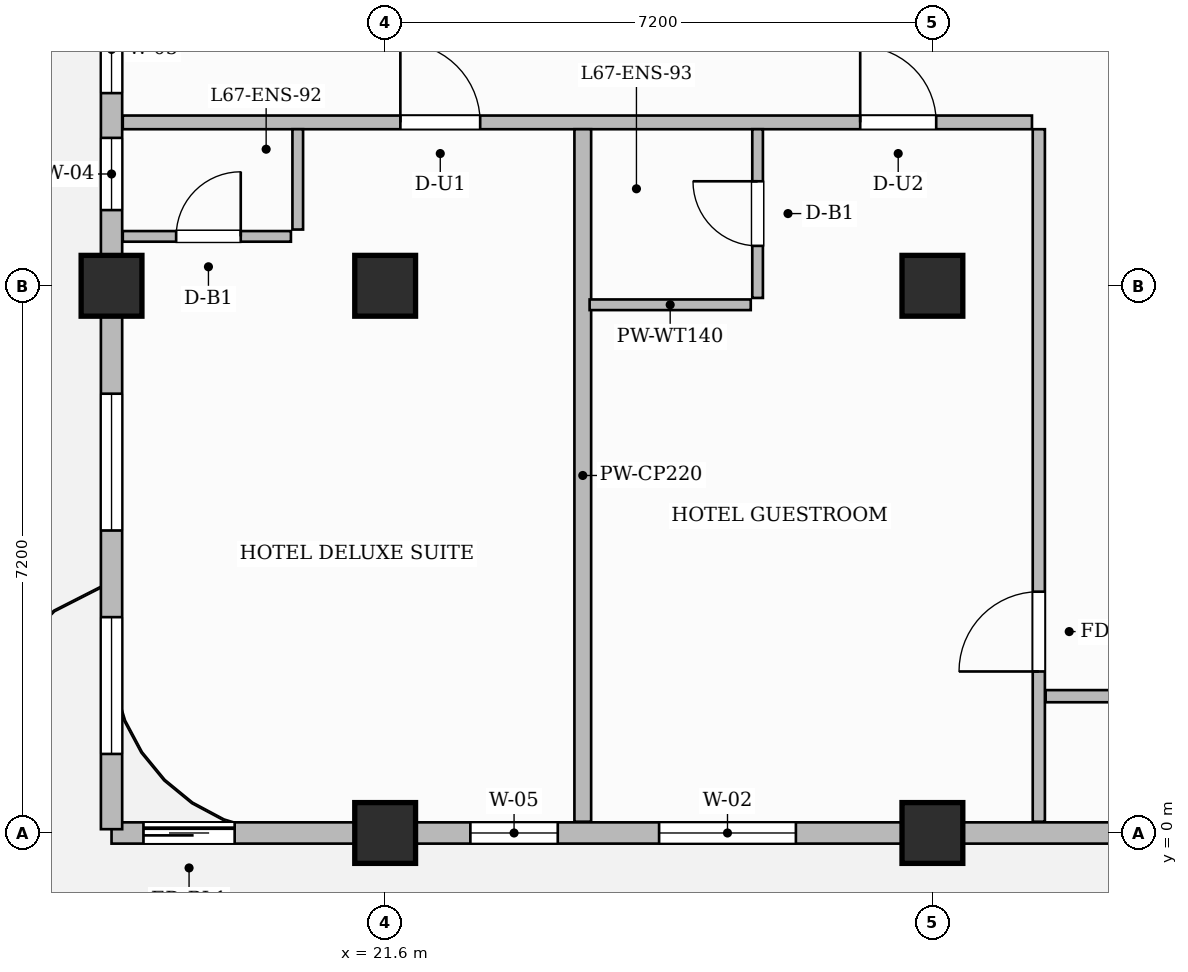
"""IFC4 building model, lengths in metres.
Left out: names, types, materials, properties, quantities, classifications, styles, units other than length and angle.
Written with IfcOpenShell. Run it as: python <this file> out.ifc"""

import sys

from ifc_helpers import new_model, si_unit, direction, frame, frame_2d, origin, origin_2d, place, context, subcontext, project, spatial, rectangle, extrude, source, transform, mapped, element, fill, save


model = new_model("IFC4")
c1 = context("Model", 3, precision=1e-05, world=origin(), true_north=direction((0.0, 1.0)))
c2 = subcontext(c1, "Body", "Model", "MODEL_VIEW")
j1 = project(units=[si_unit("LENGTHUNIT", "METRE"), si_unit("PLANEANGLEUNIT", "RADIAN")], contexts=[c1])
p1 = place(None, origin())
s1 = spatial("IfcSite", under=j1, at=p1, CompositionType="ELEMENT")
p2 = place(p1, origin())
s2 = spatial("IfcBuilding", under=s1, at=p2, CompositionType="ELEMENT")
p3 = place(p2, frame((0.0, 0.0, 267.35)))
s3 = spatial("IfcBuildingStorey", under=s2, at=p3, CompositionType="ELEMENT", Elevation=267.35)
m1 = source(origin(), c2, "Body", "SweptSolid", [
    extrude(rectangle(XDim=0.8, YDim=0.8, at=origin_2d()), origin(), (0.0, 0.0, 1.0), 3.85),
])
for number, where, z_axis, x_axis in (
    (1, (21.6, 0.0, 0.0), (0.0, 0.0, 1.0), (1.0, 0.0, 0.0)),
    (2, (21.6, 7.2, 0.0), (0.0, 0.0, 1.0), (1.0, 0.0, 0.0)),
    (3, (28.8, 0.0, 0.0), (0.0, 0.0, 1.0), (1.0, 0.0, 0.0)),
    (4, (28.8, 7.2, 0.0), (0.0, 0.0, 1.0), (1.0, 0.0, 0.0)),
    (5, (18.0, 7.2, 0.0), (0.0, 0.0, 1.0), (1.0, 0.0, 0.0)),
):
    element("IfcColumn", number, at=place(p3, frame(where, z_axis=z_axis, x_axis=x_axis)), inside=s3, PredefinedType="COLUMN", context=c2, shape_type="MappedRepresentation", body=[
        mapped(m1, transform((0.0, 0.0, 0.0), scale=1.0)),
    ])
p4 = place(p3, frame((18.148, 9.35, 0.0), z_axis=(0.0, 0.0, 1.0), x_axis=(1.0, 0.0, 0.0)))
e6 = element("IfcWall", 6, at=p4, inside=s3, PredefinedType="PARTITIONING", context=c2, shape_type="SweptSolid", body=[
    extrude(rectangle(XDim=11.962, YDim=0.18, at=frame_2d((5.981, 0.0))), origin(), (0.0, 0.0, 1.0), 3.6),
])
p5 = place(p4, frame((3.652, 0.0, 0.0)))
e7 = element("IfcOpeningElement", 7, at=p5, cuts=e6, PredefinedType="OPENING", context=c2, shape_type="SweptSolid", body=[
    extrude(rectangle(XDim=1.05, YDim=2.25, at=frame_2d((0.525, 1.125))), frame((0.0, 0.1, 0.0), z_axis=(0.0, -1.0, 0.0), x_axis=(1.0, 0.0, 0.0)), (0.0, 0.0, 1.0), 0.2),
])
p6 = place(p4, frame((9.702, 0.0, 0.0)))
e8 = element("IfcOpeningElement", 8, at=p6, cuts=e6, PredefinedType="OPENING", context=c2, shape_type="SweptSolid", body=[
    extrude(rectangle(XDim=1.0, YDim=2.2, at=frame_2d((0.5, 1.1))), frame((0.0, 0.1, 0.0), z_axis=(0.0, -1.0, 0.0), x_axis=(1.0, 0.0, 0.0)), (0.0, 0.0, 1.0), 0.2),
])
p7 = place(p3, frame((30.2, 0.148, 0.0), z_axis=(0.0, 0.0, 1.0), x_axis=(0.0, 1.0, 0.0)))
e9 = element("IfcWall", 9, at=p7, inside=s3, PredefinedType="PARTITIONING", context=c2, shape_type="SweptSolid", body=[
    extrude(rectangle(XDim=9.112, YDim=0.16, at=frame_2d((4.556, 0.0))), origin(), (0.0, 0.0, 1.0), 3.6),
])
p8 = place(p7, frame((1.977, 0.0, 0.0)))
e10 = element("IfcOpeningElement", 10, at=p8, cuts=e9, PredefinedType="OPENING", context=c2, shape_type="SweptSolid", body=[
    extrude(rectangle(XDim=1.05, YDim=2.15, at=frame_2d((0.525, 1.075))), frame((0.0, 0.09, 0.0), z_axis=(0.0, -1.0, 0.0), x_axis=(1.0, 0.0, 0.0)), (0.0, 0.0, 1.0), 0.18),
])
p9 = place(p3, frame((30.29, 1.8, 0.0), z_axis=(0.0, 0.0, 1.0), x_axis=(1.0, 0.0, 0.0)))
e11 = element("IfcWall", 11, at=p9, inside=s3, PredefinedType="PARTITIONING", context=c2, shape_type="SweptSolid", body=[
    extrude(rectangle(XDim=19.37, YDim=0.16, at=frame_2d((9.685, 0.0))), origin(), (0.0, 0.0, 1.0), 3.6),
])
p10 = place(p9, frame((3.054, 0.0, 0.0)))
e12 = element("IfcOpeningElement", 12, at=p10, cuts=e11, PredefinedType="OPENING", context=c2, shape_type="SweptSolid", body=[
    extrude(rectangle(XDim=0.9, YDim=2.15, at=frame_2d((0.45, 1.075))), frame((0.0, 0.09, 0.0), z_axis=(0.0, -1.0, 0.0), x_axis=(1.0, 0.0, 0.0)), (0.0, 0.0, 1.0), 0.18),
])
p11 = place(p9, frame((9.66, 0.0, 0.0)))
e13 = element("IfcOpeningElement", 13, at=p11, cuts=e11, PredefinedType="OPENING", context=c2, shape_type="SweptSolid", body=[
    extrude(rectangle(XDim=0.9, YDim=2.15, at=frame_2d((0.45, 1.075))), frame((0.0, 0.09, 0.0), z_axis=(0.0, -1.0, 0.0), x_axis=(1.0, 0.0, 0.0)), (0.0, 0.0, 1.0), 0.18),
])
p12 = place(p9, frame((15.86, 0.0, 0.0)))
e14 = element("IfcOpeningElement", 14, at=p12, cuts=e11, PredefinedType="OPENING", context=c2, shape_type="SweptSolid", body=[
    extrude(rectangle(XDim=0.9, YDim=2.15, at=frame_2d((0.45, 1.075))), frame((0.0, 0.09, 0.0), z_axis=(0.0, -1.0, 0.0), x_axis=(1.0, 0.0, 0.0)), (0.0, 0.0, 1.0), 0.18),
])
p13 = place(p3, frame((24.2, 0.148, 0.0), z_axis=(0.0, 0.0, 1.0), x_axis=(0.0, 1.0, 0.0)))
e15 = element("IfcWall", 15, at=p13, inside=s3, PredefinedType="PARTITIONING", context=c2, shape_type="SweptSolid", body=[
    extrude(rectangle(XDim=9.112, YDim=0.22, at=frame_2d((4.556, 0.0))), origin(), (0.0, 0.0, 1.0), 3.6),
])
p14 = place(p3, frame((20.45, 7.94, 0.0), z_axis=(0.0, 0.0, 1.0), x_axis=(0.0, 1.0, 0.0)))
e16 = element("IfcWall", 16, at=p14, inside=s3, PredefinedType="PARTITIONING", context=c2, shape_type="SweptSolid", body=[
    extrude(rectangle(XDim=1.32, YDim=0.14, at=frame_2d((0.66, 0.0))), origin(), (0.0, 0.0, 1.0), 3.6),
])
p15 = place(p3, frame((18.148, 7.85, 0.0), z_axis=(0.0, 0.0, 1.0), x_axis=(1.0, 0.0, 0.0)))
e17 = element("IfcWall", 17, at=p15, inside=s3, PredefinedType="PARTITIONING", context=c2, shape_type="SweptSolid", body=[
    extrude(rectangle(XDim=2.212, YDim=0.14, at=frame_2d((1.106, 0.0))), origin(), (0.0, 0.0, 1.0), 3.6),
])
p16 = place(p15, frame((0.702, 0.0, 0.0)))
e18 = element("IfcOpeningElement", 18, at=p16, cuts=e17, PredefinedType="OPENING", context=c2, shape_type="SweptSolid", body=[
    extrude(rectangle(XDim=0.85, YDim=2.1, at=frame_2d((0.425, 1.05))), frame((0.0, 0.08, 0.0), z_axis=(0.0, -1.0, 0.0), x_axis=(1.0, 0.0, 0.0)), (0.0, 0.0, 1.0), 0.16),
])
p17 = place(p3, frame((26.5, 7.04, 0.0), z_axis=(0.0, 0.0, 1.0), x_axis=(0.0, 1.0, 0.0)))
e19 = element("IfcWall", 19, at=p17, inside=s3, PredefinedType="PARTITIONING", context=c2, shape_type="SweptSolid", body=[
    extrude(rectangle(XDim=2.22, YDim=0.14, at=frame_2d((1.11, 0.0))), origin(), (0.0, 0.0, 1.0), 3.6),
])
p18 = place(p17, frame((0.685, 0.0, 0.0)))
e20 = element("IfcOpeningElement", 20, at=p18, cuts=e19, PredefinedType="OPENING", context=c2, shape_type="SweptSolid", body=[
    extrude(rectangle(XDim=0.85, YDim=2.1, at=frame_2d((0.425, 1.05))), frame((0.0, 0.08, 0.0), z_axis=(0.0, -1.0, 0.0), x_axis=(1.0, 0.0, 0.0)), (0.0, 0.0, 1.0), 0.16),
])
p19 = place(p3, frame((24.29, 6.95, 0.0), z_axis=(0.0, 0.0, 1.0), x_axis=(1.0, 0.0, 0.0)))
e21 = element("IfcWall", 21, at=p19, inside=s3, PredefinedType="PARTITIONING", context=c2, shape_type="SweptSolid", body=[
    extrude(rectangle(XDim=2.12, YDim=0.14, at=frame_2d((1.06, 0.0))), origin(), (0.0, 0.0, 1.0), 3.185),
])
p20 = place(p3, frame((18.0, 0.0, 0.0), z_axis=(0.0, 0.0, 1.0), x_axis=(1.0, 0.0, 0.0)))
e22 = element("IfcWall", 22, at=p20, inside=s3, PredefinedType="SOLIDWALL", context=c2, shape_type="SweptSolid", body=[
    extrude(rectangle(XDim=31.8, YDim=0.28, at=frame_2d((15.9, 0.0))), origin(), (0.0, 0.0, 1.0), 3.185),
])
p21 = place(p20, frame((0.42, 0.0, 0.0)))
e23 = element("IfcOpeningElement", 23, at=p21, cuts=e22, PredefinedType="OPENING", context=c2, shape_type="SweptSolid", body=[
    extrude(rectangle(XDim=1.2, YDim=2.2, at=frame_2d((0.6, 1.1))), frame((0.0, 0.15, 0.0), z_axis=(0.0, -1.0, 0.0), x_axis=(1.0, 0.0, 0.0)), (0.0, 0.0, 1.0), 0.3),
])
p22 = place(p20, frame((4.721, 0.0, 0.8)))
e24 = element("IfcOpeningElement", 24, at=p22, cuts=e22, PredefinedType="OPENING", context=c2, shape_type="SweptSolid", body=[
    extrude(rectangle(XDim=1.15, YDim=1.8, at=frame_2d((0.575, 0.9))), frame((0.0, 0.15, 0.0), z_axis=(0.0, -1.0, 0.0), x_axis=(1.0, 0.0, 0.0)), (0.0, 0.0, 1.0), 0.3),
])
p23 = place(p20, frame((7.204, 0.0, 0.8)))
e25 = element("IfcOpeningElement", 25, at=p23, cuts=e22, PredefinedType="OPENING", context=c2, shape_type="SweptSolid", body=[
    extrude(rectangle(XDim=1.8, YDim=1.85, at=frame_2d((0.9, 0.925))), frame((0.0, 0.15, 0.0), z_axis=(0.0, -1.0, 0.0), x_axis=(1.0, 0.0, 0.0)), (0.0, 0.0, 1.0), 0.3),
])
p24 = place(p20, frame((13.204, 0.0, 0.8)))
e26 = element("IfcOpeningElement", 26, at=p24, cuts=e22, PredefinedType="OPENING", context=c2, shape_type="SweptSolid", body=[
    extrude(rectangle(XDim=1.8, YDim=1.85, at=frame_2d((0.9, 0.925))), frame((0.0, 0.15, 0.0), z_axis=(0.0, -1.0, 0.0), x_axis=(1.0, 0.0, 0.0)), (0.0, 0.0, 1.0), 0.3),
])
p25 = place(p20, frame((17.921, 0.0, 0.8)))
e27 = element("IfcOpeningElement", 27, at=p25, cuts=e22, PredefinedType="OPENING", context=c2, shape_type="SweptSolid", body=[
    extrude(rectangle(XDim=0.95, YDim=1.75, at=frame_2d((0.475, 0.875))), frame((0.0, 0.15, 0.0), z_axis=(0.0, -1.0, 0.0), x_axis=(1.0, 0.0, 0.0)), (0.0, 0.0, 1.0), 0.3),
])
p26 = place(p20, frame((20.304, 0.0, 0.8)))
e28 = element("IfcOpeningElement", 28, at=p26, cuts=e22, PredefinedType="OPENING", context=c2, shape_type="SweptSolid", body=[
    extrude(rectangle(XDim=1.8, YDim=1.85, at=frame_2d((0.9, 0.925))), frame((0.0, 0.15, 0.0), z_axis=(0.0, -1.0, 0.0), x_axis=(1.0, 0.0, 0.0)), (0.0, 0.0, 1.0), 0.3),
])
p27 = place(p20, frame((26.081, 0.0, 0.8)))
e29 = element("IfcOpeningElement", 29, at=p27, cuts=e22, PredefinedType="OPENING", context=c2, shape_type="SweptSolid", body=[
    extrude(rectangle(XDim=1.8, YDim=1.85, at=frame_2d((0.9, 0.925))), frame((0.0, 0.15, 0.0), z_axis=(0.0, -1.0, 0.0), x_axis=(1.0, 0.0, 0.0)), (0.0, 0.0, 1.0), 0.3),
])
p28 = place(p20, frame((28.727, 0.0, 0.8)))
e30 = element("IfcOpeningElement", 30, at=p28, cuts=e22, PredefinedType="OPENING", context=c2, shape_type="SweptSolid", body=[
    extrude(rectangle(XDim=1.8, YDim=1.85, at=frame_2d((0.9, 0.925))), frame((0.0, 0.15, 0.0), z_axis=(0.0, -1.0, 0.0), x_axis=(1.0, 0.0, 0.0)), (0.0, 0.0, 1.0), 0.3),
])
p29 = place(p3, frame((18.0, 0.05, 0.0), z_axis=(0.0, 0.0, 1.0), x_axis=(0.0, 1.0, 0.0)))
e31 = element("IfcWall", 31, at=p29, inside=s3, PredefinedType="SOLIDWALL", context=c2, shape_type="SweptSolid", body=[
    extrude(rectangle(XDim=21.5, YDim=0.28, at=frame_2d((10.75, 0.0))), origin(), (0.0, 0.0, 1.0), 3.6),
])
p30 = place(p29, frame((0.99, 0.0, 0.8)))
e32 = element("IfcOpeningElement", 32, at=p30, cuts=e31, PredefinedType="OPENING", context=c2, shape_type="SweptSolid", body=[
    extrude(rectangle(XDim=1.8, YDim=1.85, at=frame_2d((0.9, 0.925))), frame((0.0, 0.15, 0.0), z_axis=(0.0, -1.0, 0.0), x_axis=(1.0, 0.0, 0.0)), (0.0, 0.0, 1.0), 0.3),
])
p31 = place(p29, frame((3.93, 0.0, 0.8)))
e33 = element("IfcOpeningElement", 33, at=p31, cuts=e31, PredefinedType="OPENING", context=c2, shape_type="SweptSolid", body=[
    extrude(rectangle(XDim=1.8, YDim=1.85, at=frame_2d((0.9, 0.925))), frame((0.0, 0.15, 0.0), z_axis=(0.0, -1.0, 0.0), x_axis=(1.0, 0.0, 0.0)), (0.0, 0.0, 1.0), 0.3),
])
p32 = place(p29, frame((8.146, 0.0, 0.8)))
e34 = element("IfcOpeningElement", 34, at=p32, cuts=e31, PredefinedType="OPENING", context=c2, shape_type="SweptSolid", body=[
    extrude(rectangle(XDim=0.95, YDim=1.75, at=frame_2d((0.475, 0.875))), frame((0.0, 0.15, 0.0), z_axis=(0.0, -1.0, 0.0), x_axis=(1.0, 0.0, 0.0)), (0.0, 0.0, 1.0), 0.3),
])
p33 = place(p29, frame((9.685, 0.0, 0.8)))
e35 = element("IfcOpeningElement", 35, at=p33, cuts=e31, PredefinedType="OPENING", context=c2, shape_type="SweptSolid", body=[
    extrude(rectangle(XDim=1.15, YDim=1.8, at=frame_2d((0.575, 0.9))), frame((0.0, 0.15, 0.0), z_axis=(0.0, -1.0, 0.0), x_axis=(1.0, 0.0, 0.0)), (0.0, 0.0, 1.0), 0.3),
])
p34 = place(p29, frame((11.689, 0.0, 0.8)))
e36 = element("IfcOpeningElement", 36, at=p34, cuts=e31, PredefinedType="OPENING", context=c2, shape_type="SweptSolid", body=[
    extrude(rectangle(XDim=1.4, YDim=1.85, at=frame_2d((0.7, 0.925))), frame((0.0, 0.15, 0.0), z_axis=(0.0, -1.0, 0.0), x_axis=(1.0, 0.0, 0.0)), (0.0, 0.0, 1.0), 0.3),
])
p35 = place(p29, frame((15.77, 0.0, 0.8)))
e37 = element("IfcOpeningElement", 37, at=p35, cuts=e31, PredefinedType="OPENING", context=c2, shape_type="SweptSolid", body=[
    extrude(rectangle(XDim=1.8, YDim=1.85, at=frame_2d((0.9, 0.925))), frame((0.0, 0.15, 0.0), z_axis=(0.0, -1.0, 0.0), x_axis=(1.0, 0.0, 0.0)), (0.0, 0.0, 1.0), 0.3),
])
p36 = place(p29, frame((18.71, 0.0, 0.8)))
e38 = element("IfcOpeningElement", 38, at=p36, cuts=e31, PredefinedType="OPENING", context=c2, shape_type="SweptSolid", body=[
    extrude(rectangle(XDim=1.8, YDim=1.85, at=frame_2d((0.9, 0.925))), frame((0.0, 0.15, 0.0), z_axis=(0.0, -1.0, 0.0), x_axis=(1.0, 0.0, 0.0)), (0.0, 0.0, 1.0), 0.3),
])
m2 = source(origin(), c2, "Body", "SweptSolid", [
    extrude(rectangle(XDim=1.05, YDim=2.15, at=frame_2d((0.525, 1.075))), frame((0.0, 0.025, 0.0), z_axis=(0.0, -1.0, 0.0), x_axis=(1.0, 0.0, 0.0)), (0.0, 0.0, 1.0), 0.05),
])
p37 = place(p8, origin())
e39 = element("IfcDoor", 39, at=p37, inside=s3, OperationType="SINGLE_SWING_LEFT", PredefinedType="DOOR", context=c2, shape_type="MappedRepresentation", body=[
    mapped(m2, transform((0.0, 0.0, 0.0), scale=1.0)),
])
fill(e10, e39)
m3 = source(origin(), c2, "Body", "SweptSolid", [
    extrude(rectangle(XDim=0.85, YDim=2.1, at=frame_2d((0.425, 1.05))), frame((0.0, 0.025, 0.0), z_axis=(0.0, -1.0, 0.0), x_axis=(1.0, 0.0, 0.0)), (0.0, 0.0, 1.0), 0.05),
])
p38 = place(p16, origin())
e40 = element("IfcDoor", 40, at=p38, inside=s3, OperationType="SINGLE_SWING_RIGHT", PredefinedType="DOOR", context=c2, shape_type="MappedRepresentation", body=[
    mapped(m3, transform((0.0, 0.0, 0.0), scale=1.0)),
])
fill(e18, e40)
m4 = source(origin(), c2, "Body", "SweptSolid", [
    extrude(rectangle(XDim=1.05, YDim=2.25, at=frame_2d((0.525, 1.125))), frame((0.0, 0.025, 0.0), z_axis=(0.0, -1.0, 0.0), x_axis=(1.0, 0.0, 0.0)), (0.0, 0.0, 1.0), 0.05),
])
p39 = place(p5, origin())
e41 = element("IfcDoor", 41, at=p39, inside=s3, OperationType="SINGLE_SWING_LEFT", PredefinedType="DOOR", context=c2, shape_type="MappedRepresentation", body=[
    mapped(m4, transform((0.0, 0.0, 0.0), scale=1.0)),
])
fill(e7, e41)
p40 = place(p18, origin())
e42 = element("IfcDoor", 42, at=p40, inside=s3, OperationType="SINGLE_SWING_RIGHT", PredefinedType="DOOR", context=c2, shape_type="MappedRepresentation", body=[
    mapped(m3, transform((0.0, 0.0, 0.0), scale=1.0)),
])
fill(e20, e42)
m5 = source(origin(), c2, "Body", "SweptSolid", [
    extrude(rectangle(XDim=1.0, YDim=2.2, at=frame_2d((0.5, 1.1))), frame((0.0, 0.025, 0.0), z_axis=(0.0, -1.0, 0.0), x_axis=(1.0, 0.0, 0.0)), (0.0, 0.0, 1.0), 0.05),
])
p41 = place(p6, origin())
e43 = element("IfcDoor", 43, at=p41, inside=s3, OperationType="SINGLE_SWING_LEFT", PredefinedType="DOOR", context=c2, shape_type="MappedRepresentation", body=[
    mapped(m5, transform((0.0, 0.0, 0.0), scale=1.0)),
])
fill(e8, e43)
m6 = source(origin(), c2, "Body", "SweptSolid", [
    extrude(rectangle(XDim=1.2, YDim=2.2, at=frame_2d((0.6, 1.1))), frame((0.0, 0.025, 0.0), z_axis=(0.0, -1.0, 0.0), x_axis=(1.0, 0.0, 0.0)), (0.0, 0.0, 1.0), 0.05),
])
p42 = place(p21, origin())
e44 = element("IfcDoor", 44, at=p42, inside=s3, OperationType="SLIDING_TO_LEFT", PredefinedType="DOOR", context=c2, shape_type="MappedRepresentation", body=[
    mapped(m6, transform((0.0, 0.0, 0.0), scale=1.0)),
])
fill(e23, e44)
m7 = source(origin(), c2, "Body", "SweptSolid", [
    extrude(rectangle(XDim=1.15, YDim=1.8, at=frame_2d((0.575, 0.9))), frame((0.0, 0.03, 0.0), z_axis=(0.0, -1.0, 0.0), x_axis=(1.0, 0.0, 0.0)), (0.0, 0.0, 1.0), 0.06),
])
p43 = place(p22, origin())
e45 = element("IfcWindow", 45, at=p43, inside=s3, PartitioningType="SINGLE_PANEL", PredefinedType="WINDOW", context=c2, shape_type="MappedRepresentation", body=[
    mapped(m7, transform((0.0, 0.0, 0.0), scale=1.0)),
])
fill(e24, e45)
m8 = source(origin(), c2, "Body", "SweptSolid", [
    extrude(rectangle(XDim=1.8, YDim=1.85, at=frame_2d((0.9, 0.925))), frame((0.0, 0.03, 0.0), z_axis=(0.0, -1.0, 0.0), x_axis=(1.0, 0.0, 0.0)), (0.0, 0.0, 1.0), 0.06),
])
p44 = place(p23, origin())
e46 = element("IfcWindow", 46, at=p44, inside=s3, PartitioningType="DOUBLE_PANEL_VERTICAL", PredefinedType="WINDOW", context=c2, shape_type="MappedRepresentation", body=[
    mapped(m8, transform((0.0, 0.0, 0.0), scale=1.0)),
])
fill(e25, e46)
p45 = place(p30, origin())
e47 = element("IfcWindow", 47, at=p45, inside=s3, PartitioningType="DOUBLE_PANEL_VERTICAL", PredefinedType="WINDOW", context=c2, shape_type="MappedRepresentation", body=[
    mapped(m8, transform((0.0, 0.0, 0.0), scale=1.0)),
])
fill(e32, e47)
p46 = place(p31, origin())
e48 = element("IfcWindow", 48, at=p46, inside=s3, PartitioningType="DOUBLE_PANEL_VERTICAL", PredefinedType="WINDOW", context=c2, shape_type="MappedRepresentation", body=[
    mapped(m8, transform((0.0, 0.0, 0.0), scale=1.0)),
])
fill(e33, e48)
m9 = source(origin(), c2, "Body", "SweptSolid", [
    extrude(rectangle(XDim=0.95, YDim=1.75, at=frame_2d((0.475, 0.875))), frame((0.0, 0.03, 0.0), z_axis=(0.0, -1.0, 0.0), x_axis=(1.0, 0.0, 0.0)), (0.0, 0.0, 1.0), 0.06),
])
p47 = place(p32, origin())
e49 = element("IfcWindow", 49, at=p47, inside=s3, PartitioningType="SINGLE_PANEL", PredefinedType="WINDOW", context=c2, shape_type="MappedRepresentation", body=[
    mapped(m9, transform((0.0, 0.0, 0.0), scale=1.0)),
])
fill(e34, e49)
p48 = place(p33, origin())
e50 = element("IfcWindow", 50, at=p48, inside=s3, PartitioningType="SINGLE_PANEL", PredefinedType="WINDOW", context=c2, shape_type="MappedRepresentation", body=[
    mapped(m7, transform((0.0, 0.0, 0.0), scale=1.0)),
])
fill(e35, e50)
save(model, sys.argv[1])
